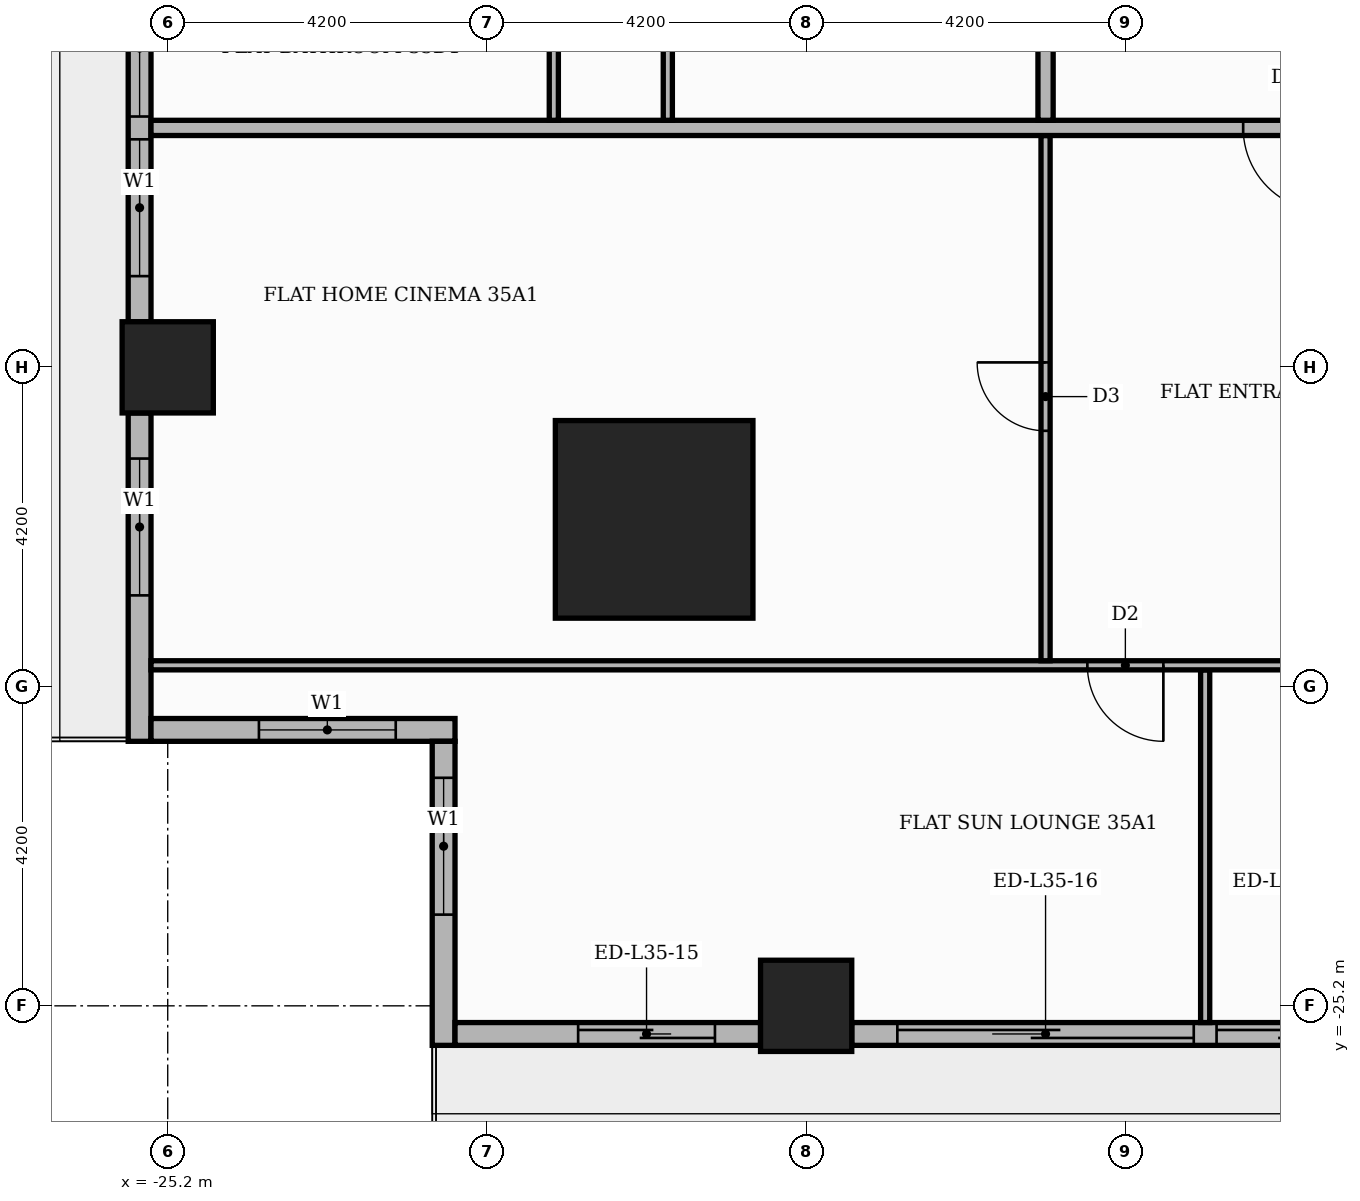
"""IFC4 building model, lengths in metres.
Left out: names, types, materials, properties, quantities, classifications, styles, units other than length and angle.
Written with IfcOpenShell. Run it as: python <this file> out.ifc"""

import sys

from ifc_helpers import new_model, si_unit, direction, frame, frame_2d, origin, origin_2d, place, context, subcontext, project, spatial, rectangle, extrude, element, fill, save


model = new_model("IFC4")
c1 = context("Model", 3, precision=1e-05, world=origin(), true_north=direction((0.0, 1.0)))
c2 = subcontext(c1, "Body", "Model", "MODEL_VIEW")
j1 = project(units=[si_unit("LENGTHUNIT", "METRE"), si_unit("PLANEANGLEUNIT", "RADIAN")], contexts=[c1])
p1 = place(None, origin())
s1 = spatial("IfcSite", under=j1, at=p1, CompositionType="ELEMENT")
p2 = place(p1, origin())
s2 = spatial("IfcBuilding", under=s1, at=p2, CompositionType="ELEMENT")
p3 = place(p2, frame((0.0, 0.0, 149.4)))
s3 = spatial("IfcBuildingStorey", under=s2, at=p3, CompositionType="ELEMENT", Elevation=149.4)
p4 = place(p3, frame((-18.8, -18.8, 0.0), z_axis=(0.0, 0.0, 1.0), x_axis=(1.0, 0.0, 0.0)))
e1 = element("IfcColumn", 1, at=p4, inside=s3, PredefinedType="COLUMN", context=c2, shape_type="SweptSolid", body=[
    extrude(rectangle(XDim=2.6, YDim=2.6, at=origin_2d()), origin(), (0.0, 0.0, 1.0), 3.9),
])
for number, where, z_axis, x_axis in (
    (2, (-16.8, -25.2, 0.0), (0.0, 0.0, 1.0), (1.0, 0.0, 0.0)),
    (3, (-25.2, -16.8, 0.0), (0.0, 0.0, 1.0), (1.0, 0.0, 0.0)),
):
    element("IfcColumn", number, at=place(p3, frame(where, z_axis=z_axis, x_axis=x_axis)), inside=s3, PredefinedType="COLUMN", context=c2, shape_type="SweptSolid", body=[
        extrude(rectangle(XDim=1.2, YDim=1.2, at=origin_2d()), origin(), (0.0, 0.0, 1.0), 3.9),
    ])
p5 = place(p3, frame((-25.57, -9.0, 0.0), z_axis=(0.0, 0.0, 1.0), x_axis=(0.0, -1.0, 0.0)))
e4 = element("IfcWall", 4, at=p5, inside=s3, PredefinedType="STANDARD", context=c2, shape_type="SweptSolid", body=[
    extrude(rectangle(XDim=7.2, YDim=0.3, at=frame_2d((3.6, 0.0))), origin(), (0.0, 0.0, 1.0), 3.48),
])
p6 = place(p5, frame((0.6, 0.0, 0.9)))
e5 = element("IfcOpeningElement", 5, at=p6, cuts=e4, PredefinedType="OPENING", context=c2, shape_type="SweptSolid", body=[
    extrude(rectangle(XDim=1.8, YDim=2.1, at=frame_2d((0.9, 1.05))), frame((0.0, 0.16, 0.0), z_axis=(0.0, -1.0, 0.0), x_axis=(1.0, 0.0, 0.0)), (0.0, 0.0, 1.0), 0.32),
])
p7 = place(p5, frame((2.7, 0.0, 0.9)))
e6 = element("IfcOpeningElement", 6, at=p7, cuts=e4, PredefinedType="OPENING", context=c2, shape_type="SweptSolid", body=[
    extrude(rectangle(XDim=1.8, YDim=2.1, at=frame_2d((0.9, 1.05))), frame((0.0, 0.16, 0.0), z_axis=(0.0, -1.0, 0.0), x_axis=(1.0, 0.0, 0.0)), (0.0, 0.0, 1.0), 0.32),
])
p8 = place(p5, frame((4.8, 0.0, 0.9)))
e7 = element("IfcOpeningElement", 7, at=p8, cuts=e4, PredefinedType="OPENING", context=c2, shape_type="SweptSolid", body=[
    extrude(rectangle(XDim=1.8, YDim=2.1, at=frame_2d((0.9, 1.05))), frame((0.0, 0.16, 0.0), z_axis=(0.0, -1.0, 0.0), x_axis=(1.0, 0.0, 0.0)), (0.0, 0.0, 1.0), 0.32),
])
p9 = place(p3, frame((-25.57, -17.4, 0.0), z_axis=(0.0, 0.0, 1.0), x_axis=(0.0, -1.0, 0.0)))
e8 = element("IfcWall", 8, at=p9, inside=s3, PredefinedType="STANDARD", context=c2, shape_type="SweptSolid", body=[
    extrude(rectangle(XDim=4.32, YDim=0.3, at=frame_2d((2.16, 0.0))), origin(), (0.0, 0.0, 1.0), 3.48),
])
p10 = place(p9, frame((0.6, 0.0, 0.9)))
e9 = element("IfcOpeningElement", 9, at=p10, cuts=e8, PredefinedType="OPENING", context=c2, shape_type="SweptSolid", body=[
    extrude(rectangle(XDim=1.8, YDim=2.1, at=frame_2d((0.9, 1.05))), frame((0.0, 0.16, 0.0), z_axis=(0.0, -1.0, 0.0), x_axis=(1.0, 0.0, 0.0)), (0.0, 0.0, 1.0), 0.32),
])
p11 = place(p3, frame((-25.42, -21.57, 0.0), z_axis=(0.0, 0.0, 1.0), x_axis=(1.0, 0.0, 0.0)))
e10 = element("IfcWall", 10, at=p11, inside=s3, PredefinedType="STANDARD", context=c2, shape_type="SweptSolid", body=[
    extrude(rectangle(XDim=4.0, YDim=0.3, at=frame_2d((2.0, 0.0))), origin(), (0.0, 0.0, 1.0), 3.48),
])
p12 = place(p11, frame((1.42, 0.0, 0.9)))
e11 = element("IfcOpeningElement", 11, at=p12, cuts=e10, PredefinedType="OPENING", context=c2, shape_type="SweptSolid", body=[
    extrude(rectangle(XDim=1.8, YDim=2.1, at=frame_2d((0.9, 1.05))), frame((0.0, 0.16, 0.0), z_axis=(0.0, -1.0, 0.0), x_axis=(1.0, 0.0, 0.0)), (0.0, 0.0, 1.0), 0.32),
])
p13 = place(p3, frame((-21.57, -21.72, 0.0), z_axis=(0.0, 0.0, 1.0), x_axis=(0.0, -1.0, 0.0)))
e12 = element("IfcWall", 12, at=p13, inside=s3, PredefinedType="STANDARD", context=c2, shape_type="SweptSolid", body=[
    extrude(rectangle(XDim=4.0, YDim=0.3, at=frame_2d((2.0, 0.0))), origin(), (0.0, 0.0, 1.0), 3.48),
])
p14 = place(p13, frame((0.48, 0.0, 0.9)))
e13 = element("IfcOpeningElement", 13, at=p14, cuts=e12, PredefinedType="OPENING", context=c2, shape_type="SweptSolid", body=[
    extrude(rectangle(XDim=1.8, YDim=2.1, at=frame_2d((0.9, 1.05))), frame((0.0, 0.16, 0.0), z_axis=(0.0, -1.0, 0.0), x_axis=(1.0, 0.0, 0.0)), (0.0, 0.0, 1.0), 0.32),
])
p15 = place(p3, frame((-21.42, -25.57, 0.0), z_axis=(0.0, 0.0, 1.0), x_axis=(1.0, 0.0, 0.0)))
e14 = element("IfcWall", 14, at=p15, inside=s3, PredefinedType="STANDARD", context=c2, shape_type="SweptSolid", body=[
    extrude(rectangle(XDim=4.02, YDim=0.3, at=frame_2d((2.01, 0.0))), origin(), (0.0, 0.0, 1.0), 3.48),
])
p16 = place(p15, frame((1.62, 0.0, 0.0)))
e15 = element("IfcOpeningElement", 15, at=p16, cuts=e14, PredefinedType="OPENING", context=c2, shape_type="SweptSolid", body=[
    extrude(rectangle(XDim=1.8, YDim=2.4, at=frame_2d((0.9, 1.2))), frame((0.0, 0.16, 0.0), z_axis=(0.0, -1.0, 0.0), x_axis=(1.0, 0.0, 0.0)), (0.0, 0.0, 1.0), 0.32),
])
p17 = place(p3, frame((-16.2, -25.57, 0.0), z_axis=(0.0, 0.0, 1.0), x_axis=(1.0, 0.0, 0.0)))
e16 = element("IfcWall", 16, at=p17, inside=s3, PredefinedType="STANDARD", context=c2, shape_type="SweptSolid", body=[
    extrude(rectangle(XDim=7.2, YDim=0.3, at=frame_2d((3.6, 0.0))), origin(), (0.0, 0.0, 1.0), 3.48),
])
p18 = place(p17, frame((0.6, 0.0, 0.0)))
e17 = element("IfcOpeningElement", 17, at=p18, cuts=e16, PredefinedType="OPENING", context=c2, shape_type="SweptSolid", body=[
    extrude(rectangle(XDim=3.9, YDim=2.4, at=frame_2d((1.95, 1.2))), frame((0.0, 0.16, 0.0), z_axis=(0.0, -1.0, 0.0), x_axis=(1.0, 0.0, 0.0)), (0.0, 0.0, 1.0), 0.32),
])
p19 = place(p17, frame((4.8, 0.0, 0.0)))
e18 = element("IfcOpeningElement", 18, at=p19, cuts=e16, PredefinedType="OPENING", context=c2, shape_type="SweptSolid", body=[
    extrude(rectangle(XDim=1.8, YDim=2.4, at=frame_2d((0.9, 1.2))), frame((0.0, 0.16, 0.0), z_axis=(0.0, -1.0, 0.0), x_axis=(1.0, 0.0, 0.0)), (0.0, 0.0, 1.0), 0.32),
])
p20 = place(p3, frame((-11.55, -25.42, 0.0), z_axis=(0.0, 0.0, 1.0), x_axis=(0.0, 1.0, 0.0)))
e19 = element("IfcWall", 19, at=p20, inside=s3, PredefinedType="PARTITIONING", context=c2, shape_type="SweptSolid", body=[
    extrude(rectangle(XDim=4.64, YDim=0.12, at=frame_2d((2.32, 0.0))), origin(), (0.0, 0.0, 1.0), 3.48),
])
p21 = place(p3, frame((-25.42, -20.72, 0.0), z_axis=(0.0, 0.0, 1.0), x_axis=(1.0, 0.0, 0.0)))
e20 = element("IfcWall", 20, at=p21, inside=s3, PredefinedType="PARTITIONING", context=c2, shape_type="SweptSolid", body=[
    extrude(rectangle(XDim=38.97, YDim=0.12, at=frame_2d((19.485, 0.0))), origin(), (0.0, 0.0, 1.0), 3.48),
])
p22 = place(p21, frame((12.32, 0.0, 0.0)))
e21 = element("IfcOpeningElement", 21, at=p22, cuts=e20, PredefinedType="OPENING", context=c2, shape_type="SweptSolid", body=[
    extrude(rectangle(XDim=1.0, YDim=2.1, at=frame_2d((0.5, 1.05))), frame((0.0, 0.07, 0.0), z_axis=(0.0, -1.0, 0.0), x_axis=(1.0, 0.0, 0.0)), (0.0, 0.0, 1.0), 0.14),
])
p23 = place(p21, frame((17.57, 0.0, 0.0)))
e22 = element("IfcOpeningElement", 22, at=p23, cuts=e20, PredefinedType="OPENING", context=c2, shape_type="SweptSolid", body=[
    extrude(rectangle(XDim=1.0, YDim=2.1, at=frame_2d((0.5, 1.05))), frame((0.0, 0.07, 0.0), z_axis=(0.0, -1.0, 0.0), x_axis=(1.0, 0.0, 0.0)), (0.0, 0.0, 1.0), 0.14),
])
p24 = place(p21, frame((24.97, 0.0, 0.0)))
e23 = element("IfcOpeningElement", 23, at=p24, cuts=e20, PredefinedType="OPENING", context=c2, shape_type="SweptSolid", body=[
    extrude(rectangle(XDim=0.9, YDim=2.1, at=frame_2d((0.45, 1.05))), frame((0.0, 0.07, 0.0), z_axis=(0.0, -1.0, 0.0), x_axis=(1.0, 0.0, 0.0)), (0.0, 0.0, 1.0), 0.14),
])
p25 = place(p21, frame((34.42, 0.0, 0.0)))
e24 = element("IfcOpeningElement", 24, at=p25, cuts=e20, PredefinedType="OPENING", context=c2, shape_type="SweptSolid", body=[
    extrude(rectangle(XDim=0.9, YDim=2.1, at=frame_2d((0.45, 1.05))), frame((0.0, 0.07, 0.0), z_axis=(0.0, -1.0, 0.0), x_axis=(1.0, 0.0, 0.0)), (0.0, 0.0, 1.0), 0.14),
])
p26 = place(p3, frame((-13.65, -20.66, 0.0), z_axis=(0.0, 0.0, 1.0), x_axis=(0.0, 1.0, 0.0)))
e25 = element("IfcWall", 25, at=p26, inside=s3, PredefinedType="PARTITIONING", context=c2, shape_type="SweptSolid", body=[
    extrude(rectangle(XDim=6.91, YDim=0.12, at=frame_2d((3.455, 0.0))), origin(), (0.0, 0.0, 1.0), 3.48),
])
p27 = place(p26, frame((3.025, 0.0, 0.0)))
e26 = element("IfcOpeningElement", 26, at=p27, cuts=e25, PredefinedType="OPENING", context=c2, shape_type="SweptSolid", body=[
    extrude(rectangle(XDim=0.9, YDim=2.1, at=frame_2d((0.45, 1.05))), frame((0.0, 0.07, 0.0), z_axis=(0.0, -1.0, 0.0), x_axis=(1.0, 0.0, 0.0)), (0.0, 0.0, 1.0), 0.14),
])
p28 = place(p3, frame((-25.42, -13.65, 0.0), z_axis=(0.0, 0.0, 1.0), x_axis=(1.0, 0.0, 0.0)))
e27 = element("IfcWall", 27, at=p28, inside=s3, PredefinedType="PARTITIONING", context=c2, shape_type="SweptSolid", body=[
    extrude(rectangle(XDim=39.07, YDim=0.2, at=frame_2d((19.535, 0.0))), origin(), (0.0, 0.0, 1.0), 3.48),
])
p29 = place(p28, frame((14.37, 0.0, 0.0)))
e28 = element("IfcOpeningElement", 28, at=p29, cuts=e27, PredefinedType="OPENING", context=c2, shape_type="SweptSolid", body=[
    extrude(rectangle(XDim=1.1, YDim=2.4, at=frame_2d((0.55, 1.2))), frame((0.0, 0.11, 0.0), z_axis=(0.0, -1.0, 0.0), x_axis=(1.0, 0.0, 0.0)), (0.0, 0.0, 1.0), 0.22),
])
p30 = place(p3, frame((-20.12, -13.55, 0.0), z_axis=(0.0, 0.0, 1.0), x_axis=(0.0, 1.0, 0.0)))
e29 = element("IfcWall", 29, at=p30, inside=s3, PredefinedType="PARTITIONING", context=c2, shape_type="SweptSolid", body=[
    extrude(rectangle(XDim=1.94, YDim=0.12, at=frame_2d((0.97, 0.0))), origin(), (0.0, 0.0, 1.0), 3.48),
])
p31 = place(p3, frame((-18.62, -13.55, 0.0), z_axis=(0.0, 0.0, 1.0), x_axis=(0.0, 1.0, 0.0)))
e30 = element("IfcWall", 30, at=p31, inside=s3, PredefinedType="PARTITIONING", context=c2, shape_type="SweptSolid", body=[
    extrude(rectangle(XDim=4.04, YDim=0.12, at=frame_2d((2.02, 0.0))), origin(), (0.0, 0.0, 1.0), 3.48),
])
p32 = place(p31, frame((1.55, 0.0, 0.0)))
e31 = element("IfcOpeningElement", 31, at=p32, cuts=e30, PredefinedType="OPENING", context=c2, shape_type="SweptSolid", body=[
    extrude(rectangle(XDim=0.9, YDim=2.1, at=frame_2d((0.45, 1.05))), frame((0.0, 0.07, 0.0), z_axis=(0.0, -1.0, 0.0), x_axis=(1.0, 0.0, 0.0)), (0.0, 0.0, 1.0), 0.14),
])
p33 = place(p3, frame((-13.65, -13.55, 0.0), z_axis=(0.0, 0.0, 1.0), x_axis=(0.0, 1.0, 0.0)))
e32 = element("IfcWall", 32, at=p33, inside=s3, PredefinedType="PARTITIONING", context=c2, shape_type="SweptSolid", body=[
    extrude(rectangle(XDim=2.45, YDim=0.2, at=frame_2d((1.225, 0.0))), origin(), (0.0, 0.0, 1.0), 3.48),
])
p34 = place(p7, origin())
e33 = element("IfcWindow", 33, at=p34, inside=s3, PartitioningType="SINGLE_PANEL", PredefinedType="WINDOW", context=c2, shape_type="SweptSolid", body=[
    extrude(rectangle(XDim=1.8, YDim=2.1, at=frame_2d((0.9, 1.05))), frame((0.0, 0.03, 0.0), z_axis=(0.0, -1.0, 0.0), x_axis=(1.0, 0.0, 0.0)), (0.0, 0.0, 1.0), 0.06),
])
fill(e6, e33)
p35 = place(p8, origin())
e34 = element("IfcWindow", 34, at=p35, inside=s3, PartitioningType="SINGLE_PANEL", PredefinedType="WINDOW", context=c2, shape_type="SweptSolid", body=[
    extrude(rectangle(XDim=1.8, YDim=2.1, at=frame_2d((0.9, 1.05))), frame((0.0, 0.03, 0.0), z_axis=(0.0, -1.0, 0.0), x_axis=(1.0, 0.0, 0.0)), (0.0, 0.0, 1.0), 0.06),
])
fill(e7, e34)
p36 = place(p10, origin())
e35 = element("IfcWindow", 35, at=p36, inside=s3, PartitioningType="SINGLE_PANEL", PredefinedType="WINDOW", context=c2, shape_type="SweptSolid", body=[
    extrude(rectangle(XDim=1.8, YDim=2.1, at=frame_2d((0.9, 1.05))), frame((0.0, 0.03, 0.0), z_axis=(0.0, -1.0, 0.0), x_axis=(1.0, 0.0, 0.0)), (0.0, 0.0, 1.0), 0.06),
])
fill(e9, e35)
p37 = place(p12, origin())
e36 = element("IfcWindow", 36, at=p37, inside=s3, PartitioningType="SINGLE_PANEL", PredefinedType="WINDOW", context=c2, shape_type="SweptSolid", body=[
    extrude(rectangle(XDim=1.8, YDim=2.1, at=frame_2d((0.9, 1.05))), frame((0.0, 0.03, 0.0), z_axis=(0.0, -1.0, 0.0), x_axis=(1.0, 0.0, 0.0)), (0.0, 0.0, 1.0), 0.06),
])
fill(e11, e36)
p38 = place(p14, origin())
e37 = element("IfcWindow", 37, at=p38, inside=s3, PartitioningType="SINGLE_PANEL", PredefinedType="WINDOW", context=c2, shape_type="SweptSolid", body=[
    extrude(rectangle(XDim=1.8, YDim=2.1, at=frame_2d((0.9, 1.05))), frame((0.0, 0.03, 0.0), z_axis=(0.0, -1.0, 0.0), x_axis=(1.0, 0.0, 0.0)), (0.0, 0.0, 1.0), 0.06),
])
fill(e13, e37)
p39 = place(p16, origin())
e38 = element("IfcDoor", 38, at=p39, inside=s3, OperationType="SLIDING_TO_RIGHT", PredefinedType="DOOR", context=c2, shape_type="SweptSolid", body=[
    extrude(rectangle(XDim=1.8, YDim=2.4, at=frame_2d((0.9, 1.2))), frame((0.0, 0.025, 0.0), z_axis=(0.0, -1.0, 0.0), x_axis=(1.0, 0.0, 0.0)), (0.0, 0.0, 1.0), 0.05),
])
fill(e15, e38)
p40 = place(p18, origin())
e39 = element("IfcDoor", 39, at=p40, inside=s3, OperationType="SLIDING_TO_LEFT", PredefinedType="DOOR", context=c2, shape_type="SweptSolid", body=[
    extrude(rectangle(XDim=3.9, YDim=2.4, at=frame_2d((1.95, 1.2))), frame((0.0, 0.025, 0.0), z_axis=(0.0, -1.0, 0.0), x_axis=(1.0, 0.0, 0.0)), (0.0, 0.0, 1.0), 0.05),
])
fill(e17, e39)
p41 = place(p19, origin())
e40 = element("IfcDoor", 40, at=p41, inside=s3, OperationType="SLIDING_TO_RIGHT", PredefinedType="DOOR", context=c2, shape_type="SweptSolid", body=[
    extrude(rectangle(XDim=1.8, YDim=2.4, at=frame_2d((0.9, 1.2))), frame((0.0, 0.025, 0.0), z_axis=(0.0, -1.0, 0.0), x_axis=(1.0, 0.0, 0.0)), (0.0, 0.0, 1.0), 0.05),
])
fill(e18, e40)
p42 = place(p29, frame((1.1, 0.0, 0.0), z_axis=(0.0, 0.0, 1.0), x_axis=(-1.0, 0.0, 0.0)))
e41 = element("IfcDoor", 41, at=p42, inside=s3, OperationType="SINGLE_SWING_RIGHT", PredefinedType="DOOR", context=c2, shape_type="SweptSolid", body=[
    extrude(rectangle(XDim=1.1, YDim=2.4, at=frame_2d((0.55, 1.2))), frame((0.0, 0.025, 0.0), z_axis=(0.0, -1.0, 0.0), x_axis=(1.0, 0.0, 0.0)), (0.0, 0.0, 1.0), 0.05),
])
fill(e28, e41)
p43 = place(p27, origin())
e42 = element("IfcDoor", 42, at=p43, inside=s3, OperationType="SINGLE_SWING_RIGHT", PredefinedType="DOOR", context=c2, shape_type="SweptSolid", body=[
    extrude(rectangle(XDim=0.9, YDim=2.1, at=frame_2d((0.45, 1.05))), frame((0.0, 0.025, 0.0), z_axis=(0.0, -1.0, 0.0), x_axis=(1.0, 0.0, 0.0)), (0.0, 0.0, 1.0), 0.05),
])
fill(e26, e42)
p44 = place(p22, frame((1.0, 0.0, 0.0), z_axis=(0.0, 0.0, 1.0), x_axis=(-1.0, 0.0, 0.0)))
e43 = element("IfcDoor", 43, at=p44, inside=s3, OperationType="SINGLE_SWING_RIGHT", PredefinedType="DOOR", context=c2, shape_type="SweptSolid", body=[
    extrude(rectangle(XDim=1.0, YDim=2.1, at=frame_2d((0.5, 1.05))), frame((0.0, 0.025, 0.0), z_axis=(0.0, -1.0, 0.0), x_axis=(1.0, 0.0, 0.0)), (0.0, 0.0, 1.0), 0.05),
])
fill(e21, e43)
save(model, sys.argv[1])
